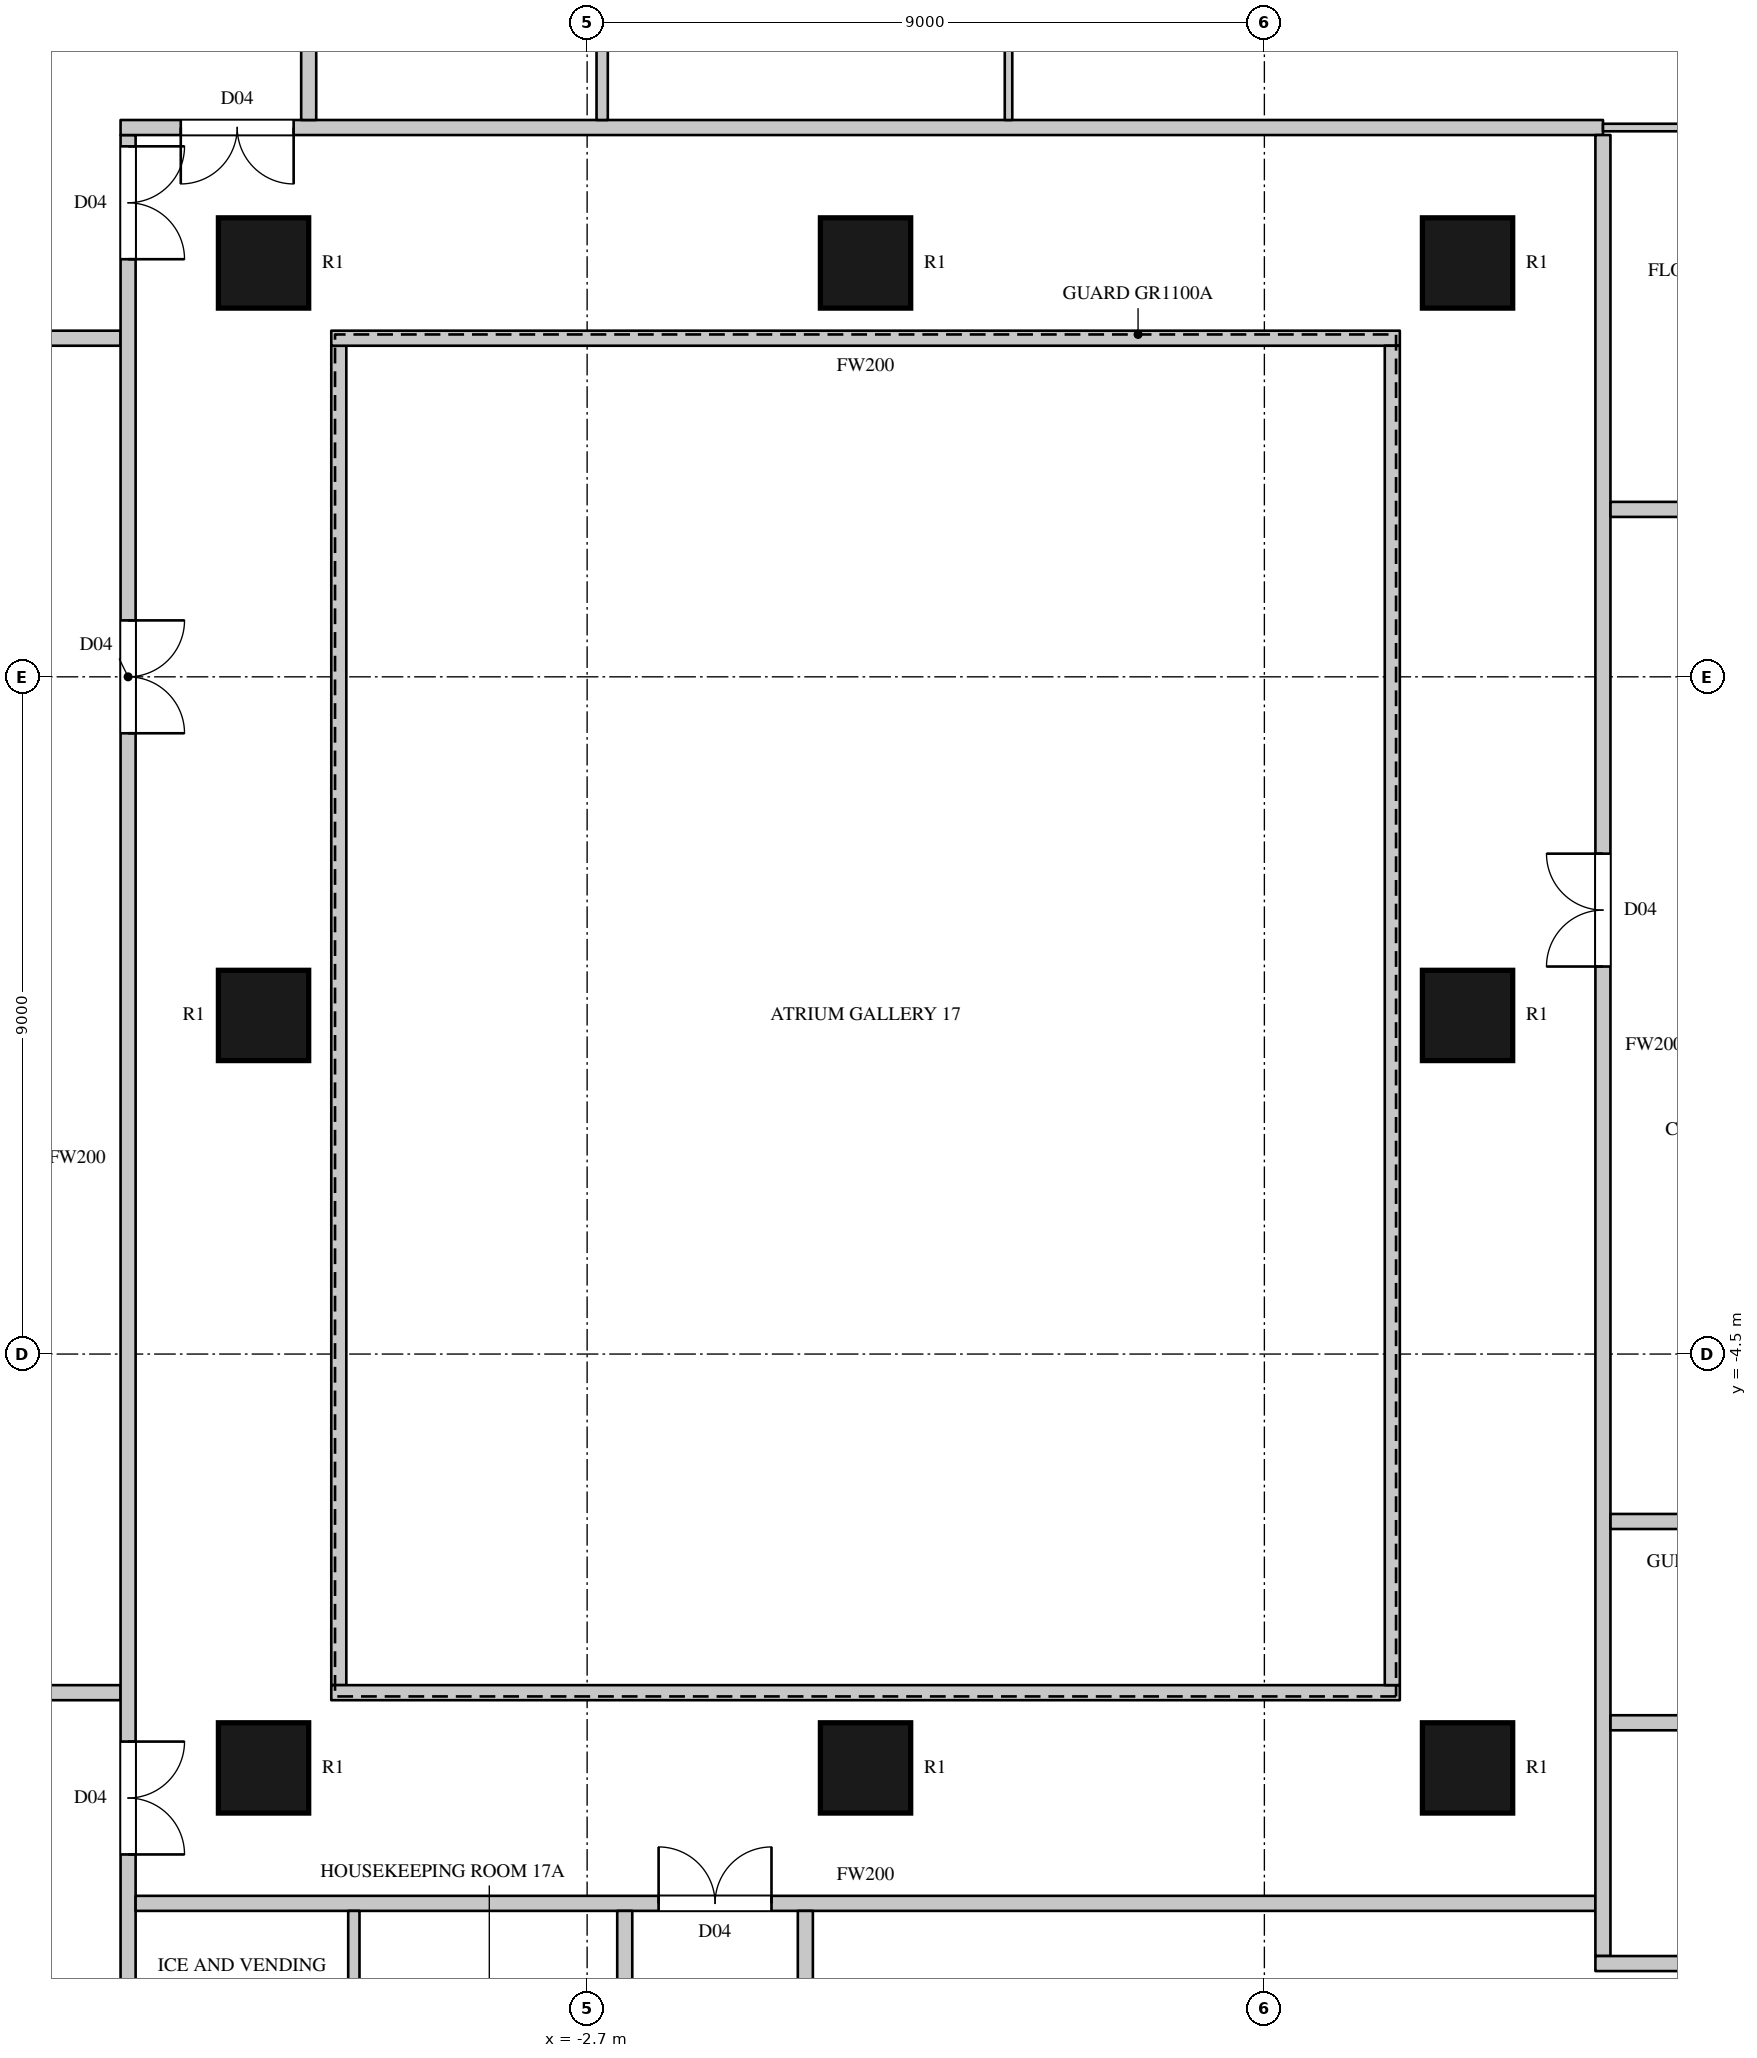
"""IFC4 building model, lengths in metres.
Left out: names, types, materials, properties, quantities, classifications, styles, units other than length and angle.
Written with IfcOpenShell. Run it as: python <this file> out.ifc"""

import sys

from ifc_helpers import new_model, si_unit, direction, frame, frame_2d, origin, origin_2d, place, context, subcontext, project, spatial, rectangle, circle, extrude, element, fill, save


model = new_model("IFC4")
c1 = context("Model", 3, precision=1e-05, world=origin(), true_north=direction((0.0, 1.0)))
c2 = subcontext(c1, "Body", "Model", "MODEL_VIEW")
j1 = project(units=[si_unit("LENGTHUNIT", "METRE"), si_unit("PLANEANGLEUNIT", "RADIAN")], contexts=[c1])
p1 = place(None, origin())
s1 = spatial("IfcSite", under=j1, at=p1, CompositionType="ELEMENT")
p2 = place(p1, origin())
s2 = spatial("IfcBuilding", under=s1, at=p2, CompositionType="ELEMENT")
p3 = place(p2, frame((0.0, 0.0, 91.5)))
s3 = spatial("IfcBuildingStorey", under=s2, at=p3, CompositionType="ELEMENT", Elevation=91.5)
for number, where, z_axis, x_axis in (
    (1, (-7.0, -10.0, 0.0), (0.0, 0.0, 1.0), (1.0, 0.0, 0.0)),
    (2, (-7.0, 0.0, 0.0), (0.0, 0.0, 1.0), (1.0, 0.0, 0.0)),
    (3, (-7.0, 10.0, 0.0), (0.0, 0.0, 1.0), (1.0, 0.0, 0.0)),
    (4, (1.0, -10.0, 0.0), (0.0, 0.0, 1.0), (1.0, 0.0, 0.0)),
    (5, (1.0, 10.0, 0.0), (0.0, 0.0, 1.0), (1.0, 0.0, 0.0)),
    (6, (9.0, -10.0, 0.0), (0.0, 0.0, 1.0), (1.0, 0.0, 0.0)),
    (7, (9.0, 0.0, 0.0), (0.0, 0.0, 1.0), (1.0, 0.0, 0.0)),
    (8, (9.0, 10.0, 0.0), (0.0, 0.0, 1.0), (1.0, 0.0, 0.0)),
):
    element("IfcColumn", number, at=place(p3, frame(where, z_axis=z_axis, x_axis=x_axis)), inside=s3, PredefinedType="COLUMN", context=c2, shape_type="SweptSolid", body=[
        extrude(circle(Radius=0.6, at=origin_2d()), origin(), (0.0, 0.0, 1.0), 3.6),
    ])
p4 = place(p3, frame((-13.97, -9.0, 0.0), z_axis=(0.0, 0.0, 1.0), x_axis=(1.0, 0.0, 0.0)))
e9 = element("IfcWall", 9, at=p4, inside=s3, PredefinedType="PARTITIONING", context=c2, shape_type="SweptSolid", body=[
    extrude(rectangle(XDim=5.07, YDim=0.2, at=frame_2d((2.535, 0.0))), origin(), (0.0, 0.0, 1.0), 3.3),
])
p5 = place(p4, frame((0.4, 0.0, 0.0)))
e10 = element("IfcOpeningElement", 10, at=p5, cuts=e9, PredefinedType="OPENING", context=c2, shape_type="SweptSolid", body=[
    extrude(rectangle(XDim=1.5, YDim=2.2, at=frame_2d((0.75, 1.1))), frame((0.0, 0.11, 0.0), z_axis=(0.0, -1.0, 0.0), x_axis=(1.0, 0.0, 0.0)), (0.0, 0.0, 1.0), 0.22),
])
p6 = place(p4, frame((2.05, 0.0, 0.0)))
e11 = element("IfcOpeningElement", 11, at=p6, cuts=e9, PredefinedType="OPENING", context=c2, shape_type="SweptSolid", body=[
    extrude(rectangle(XDim=1.5, YDim=2.2, at=frame_2d((0.75, 1.1))), frame((0.0, 0.11, 0.0), z_axis=(0.0, -1.0, 0.0), x_axis=(1.0, 0.0, 0.0)), (0.0, 0.0, 1.0), 0.22),
])
p7 = place(p3, frame((-13.97, 9.0, 0.0), z_axis=(0.0, 0.0, 1.0), x_axis=(1.0, 0.0, 0.0)))
e12 = element("IfcWall", 12, at=p7, inside=s3, PredefinedType="PARTITIONING", context=c2, shape_type="SweptSolid", body=[
    extrude(rectangle(XDim=5.07, YDim=0.2, at=frame_2d((2.535, 0.0))), origin(), (0.0, 0.0, 1.0), 3.3),
])
p8 = place(p3, frame((-8.8, -15.5, 0.0), z_axis=(0.0, 0.0, 1.0), x_axis=(0.0, 1.0, 0.0)))
e13 = element("IfcWall", 13, at=p8, inside=s3, PredefinedType="PARTITIONING", context=c2, shape_type="SweptSolid", body=[
    extrude(rectangle(XDim=27.2, YDim=0.2, at=frame_2d((13.6, 0.0))), origin(), (0.0, 0.0, 1.0), 3.3),
])
p9 = place(p8, frame((19.25, 0.0, 0.0)))
e14 = element("IfcOpeningElement", 14, at=p9, cuts=e13, PredefinedType="OPENING", context=c2, shape_type="SweptSolid", body=[
    extrude(rectangle(XDim=1.5, YDim=2.2, at=frame_2d((0.75, 1.1))), frame((0.0, 0.11, 0.0), z_axis=(0.0, -1.0, 0.0), x_axis=(1.0, 0.0, 0.0)), (0.0, 0.0, 1.0), 0.22),
])
p10 = place(p8, frame((4.35, 0.0, 0.0)))
e15 = element("IfcOpeningElement", 15, at=p10, cuts=e13, PredefinedType="OPENING", context=c2, shape_type="SweptSolid", body=[
    extrude(rectangle(XDim=1.5, YDim=2.2, at=frame_2d((0.75, 1.1))), frame((0.0, 0.11, 0.0), z_axis=(0.0, -1.0, 0.0), x_axis=(1.0, 0.0, 0.0)), (0.0, 0.0, 1.0), 0.22),
])
p11 = place(p8, frame((25.55, 0.0, 0.0)))
e16 = element("IfcOpeningElement", 16, at=p11, cuts=e13, PredefinedType="OPENING", context=c2, shape_type="SweptSolid", body=[
    extrude(rectangle(XDim=1.5, YDim=2.2, at=frame_2d((0.75, 1.1))), frame((0.0, 0.11, 0.0), z_axis=(0.0, -1.0, 0.0), x_axis=(1.0, 0.0, 0.0)), (0.0, 0.0, 1.0), 0.22),
])
p12 = place(p8, frame((0.15, 0.0, 0.0)))
e17 = element("IfcOpeningElement", 17, at=p12, cuts=e13, PredefinedType="OPENING", context=c2, shape_type="SweptSolid", body=[
    extrude(rectangle(XDim=0.9, YDim=2.2, at=frame_2d((0.45, 1.1))), frame((0.0, 0.11, 0.0), z_axis=(0.0, -1.0, 0.0), x_axis=(1.0, 0.0, 0.0)), (0.0, 0.0, 1.0), 0.22),
])
p13 = place(p3, frame((-8.7, -11.8, 0.0), z_axis=(0.0, 0.0, 1.0), x_axis=(1.0, 0.0, 0.0)))
e18 = element("IfcWall", 18, at=p13, inside=s3, PredefinedType="PARTITIONING", context=c2, shape_type="SweptSolid", body=[
    extrude(rectangle(XDim=19.4, YDim=0.2, at=frame_2d((9.7, 0.0))), origin(), (0.0, 0.0, 1.0), 3.3),
])
p14 = place(p13, frame((6.95, 0.0, 0.0)))
e19 = element("IfcOpeningElement", 19, at=p14, cuts=e18, PredefinedType="OPENING", context=c2, shape_type="SweptSolid", body=[
    extrude(rectangle(XDim=1.5, YDim=2.2, at=frame_2d((0.75, 1.1))), frame((0.0, 0.11, 0.0), z_axis=(0.0, -1.0, 0.0), x_axis=(1.0, 0.0, 0.0)), (0.0, 0.0, 1.0), 0.22),
])
p15 = place(p3, frame((-8.9, 11.8, 0.0), z_axis=(0.0, 0.0, 1.0), x_axis=(1.0, 0.0, 0.0)))
e20 = element("IfcWall", 20, at=p15, inside=s3, PredefinedType="PARTITIONING", context=c2, shape_type="SweptSolid", body=[
    extrude(rectangle(XDim=19.7, YDim=0.2, at=frame_2d((9.85, 0.0))), origin(), (0.0, 0.0, 1.0), 3.3),
])
p16 = place(p15, frame((0.8, 0.0, 0.0)))
e21 = element("IfcOpeningElement", 21, at=p16, cuts=e20, PredefinedType="OPENING", context=c2, shape_type="SweptSolid", body=[
    extrude(rectangle(XDim=1.5, YDim=2.2, at=frame_2d((0.75, 1.1))), frame((0.0, 0.11, 0.0), z_axis=(0.0, -1.0, 0.0), x_axis=(1.0, 0.0, 0.0)), (0.0, 0.0, 1.0), 0.22),
])
p17 = place(p3, frame((-6.4, 11.9, 0.0), z_axis=(0.0, 0.0, 1.0), x_axis=(0.0, 1.0, 0.0)))
e22 = element("IfcWall", 22, at=p17, inside=s3, PredefinedType="PARTITIONING", context=c2, shape_type="SweptSolid", body=[
    extrude(rectangle(XDim=3.6, YDim=0.2, at=frame_2d((1.8, 0.0))), origin(), (0.0, 0.0, 1.0), 3.3),
])
p18 = place(p17, frame((2.55, 0.0, 0.0)))
e23 = element("IfcOpeningElement", 23, at=p18, cuts=e22, PredefinedType="OPENING", context=c2, shape_type="SweptSolid", body=[
    extrude(rectangle(XDim=0.9, YDim=2.2, at=frame_2d((0.45, 1.1))), frame((0.0, 0.11, 0.0), z_axis=(0.0, -1.0, 0.0), x_axis=(1.0, 0.0, 0.0)), (0.0, 0.0, 1.0), 0.22),
])
p19 = place(p3, frame((-6.0, -8.9, 0.0), z_axis=(0.0, 0.0, 1.0), x_axis=(0.0, 1.0, 0.0)))
e24 = element("IfcWall", 24, at=p19, inside=s3, PredefinedType="PARTITIONING", context=c2, shape_type="SweptSolid", body=[
    extrude(rectangle(XDim=17.8, YDim=0.2, at=frame_2d((8.9, 0.0))), origin(), (0.0, 0.0, 1.0), 3.3),
])
for number, where, z_axis, x_axis in (
    (25, (-6.1, -9.0, 0.0), (0.0, 0.0, 1.0), (1.0, 0.0, 0.0)),
    (26, (-6.1, 9.0, 0.0), (0.0, 0.0, 1.0), (1.0, 0.0, 0.0)),
):
    element("IfcWall", number, at=place(p3, frame(where, z_axis=z_axis, x_axis=x_axis)), inside=s3, PredefinedType="PARTITIONING", context=c2, shape_type="SweptSolid", body=[
        extrude(rectangle(XDim=14.2, YDim=0.2, at=frame_2d((7.1, 0.0))), origin(), (0.0, 0.0, 1.0), 3.3),
    ])
p20 = place(p3, frame((-2.2, -15.5, 0.0), z_axis=(0.0, 0.0, 1.0), x_axis=(0.0, 1.0, 0.0)))
e27 = element("IfcWall", 27, at=p20, inside=s3, PredefinedType="PARTITIONING", context=c2, shape_type="SweptSolid", body=[
    extrude(rectangle(XDim=3.6, YDim=0.2, at=frame_2d((1.8, 0.0))), origin(), (0.0, 0.0, 1.0), 3.3),
])
p21 = place(p3, frame((0.2, -15.5, 0.0), z_axis=(0.0, 0.0, 1.0), x_axis=(0.0, 1.0, 0.0)))
e28 = element("IfcWall", 28, at=p21, inside=s3, PredefinedType="PARTITIONING", context=c2, shape_type="SweptSolid", body=[
    extrude(rectangle(XDim=3.6, YDim=0.2, at=frame_2d((1.8, 0.0))), origin(), (0.0, 0.0, 1.0), 3.3),
])
p22 = place(p21, frame((0.15, 0.0, 0.0)))
e29 = element("IfcOpeningElement", 29, at=p22, cuts=e28, PredefinedType="OPENING", context=c2, shape_type="SweptSolid", body=[
    extrude(rectangle(XDim=0.9, YDim=2.2, at=frame_2d((0.45, 1.1))), frame((0.0, 0.11, 0.0), z_axis=(0.0, -1.0, 0.0), x_axis=(1.0, 0.0, 0.0)), (0.0, 0.0, 1.0), 0.22),
])
p23 = place(p3, frame((8.0, -8.9, 0.0), z_axis=(0.0, 0.0, 1.0), x_axis=(0.0, 1.0, 0.0)))
e30 = element("IfcWall", 30, at=p23, inside=s3, PredefinedType="PARTITIONING", context=c2, shape_type="SweptSolid", body=[
    extrude(rectangle(XDim=17.8, YDim=0.2, at=frame_2d((8.9, 0.0))), origin(), (0.0, 0.0, 1.0), 3.3),
])
p24 = place(p3, frame((10.799, -12.5, 0.0), z_axis=(0.0, 0.0, 1.0), x_axis=(0.0, 1.0, 0.0)))
e31 = element("IfcWall", 31, at=p24, inside=s3, PredefinedType="PARTITIONING", context=c2, shape_type="SweptSolid", body=[
    extrude(rectangle(XDim=24.2, YDim=0.2, at=frame_2d((12.1, 0.0))), origin(), (0.0, 0.0, 1.0), 3.3),
])
p25 = place(p24, frame((13.15, 0.0, 0.0)))
e32 = element("IfcOpeningElement", 32, at=p25, cuts=e31, PredefinedType="OPENING", context=c2, shape_type="SweptSolid", body=[
    extrude(rectangle(XDim=1.5, YDim=2.2, at=frame_2d((0.75, 1.1))), frame((0.0, 0.11, 0.0), z_axis=(0.0, -1.0, 0.0), x_axis=(1.0, 0.0, 0.0)), (0.0, 0.0, 1.0), 0.22),
])
p26 = place(p3, frame((10.699, -12.6, 0.0), z_axis=(0.0, 0.0, 1.0), x_axis=(1.0, 0.0, 0.0)))
e33 = element("IfcWall", 33, at=p26, inside=s3, PredefinedType="PARTITIONING", context=c2, shape_type="SweptSolid", body=[
    extrude(rectangle(XDim=3.601, YDim=0.2, at=frame_2d((1.801, 0.0))), origin(), (0.0, 0.0, 1.0), 3.3),
])
p27 = place(p3, frame((10.9, -9.4, 0.0), z_axis=(0.0, 0.0, 1.0), x_axis=(1.0, 0.0, 0.0)))
e34 = element("IfcWall", 34, at=p27, inside=s3, PredefinedType="PARTITIONING", context=c2, shape_type="SweptSolid", body=[
    extrude(rectangle(XDim=3.4, YDim=0.2, at=frame_2d((1.7, 0.0))), origin(), (0.0, 0.0, 1.0), 3.3),
])
p28 = place(p27, frame((1.5, 0.0, 0.0)))
e35 = element("IfcOpeningElement", 35, at=p28, cuts=e34, PredefinedType="OPENING", context=c2, shape_type="SweptSolid", body=[
    extrude(rectangle(XDim=1.6, YDim=2.4, at=frame_2d((0.8, 1.2))), frame((0.0, 0.11, 0.0), z_axis=(0.0, -1.0, 0.0), x_axis=(1.0, 0.0, 0.0)), (0.0, 0.0, 1.0), 0.22),
])
p29 = place(p3, frame((10.9, -6.725, 0.0), z_axis=(0.0, 0.0, 1.0), x_axis=(1.0, 0.0, 0.0)))
e36 = element("IfcWall", 36, at=p29, inside=s3, PredefinedType="PARTITIONING", context=c2, shape_type="SweptSolid", body=[
    extrude(rectangle(XDim=3.4, YDim=0.2, at=frame_2d((1.7, 0.0))), origin(), (0.0, 0.0, 1.0), 3.3),
])
p30 = place(p3, frame((10.9, 6.725, 0.0), z_axis=(0.0, 0.0, 1.0), x_axis=(1.0, 0.0, 0.0)))
e37 = element("IfcWall", 37, at=p30, inside=s3, PredefinedType="PARTITIONING", context=c2, shape_type="SweptSolid", body=[
    extrude(rectangle(XDim=3.4, YDim=0.2, at=frame_2d((1.7, 0.0))), origin(), (0.0, 0.0, 1.0), 3.3),
])
p31 = place(p30, frame((2.1, 0.0, 0.0)))
e38 = element("IfcOpeningElement", 38, at=p31, cuts=e37, PredefinedType="OPENING", context=c2, shape_type="SweptSolid", body=[
    extrude(rectangle(XDim=0.95, YDim=2.2, at=frame_2d((0.475, 1.1))), frame((0.0, 0.11, 0.0), z_axis=(0.0, -1.0, 0.0), x_axis=(1.0, 0.0, 0.0)), (0.0, 0.0, 1.0), 0.22),
])
p32 = place(p3, frame((-5.8, -15.5, 0.0), z_axis=(0.0, 0.0, 1.0), x_axis=(0.0, 1.0, 0.0)))
e39 = element("IfcWall", 39, at=p32, inside=s3, PredefinedType="PARTITIONING", context=c2, shape_type="SweptSolid", body=[
    extrude(rectangle(XDim=3.6, YDim=0.15, at=frame_2d((1.8, 0.0))), origin(), (0.0, 0.0, 1.0), 3.3),
])
p33 = place(p3, frame((-2.5, 11.9, 0.0), z_axis=(0.0, 0.0, 1.0), x_axis=(0.0, 1.0, 0.0)))
e40 = element("IfcWall", 40, at=p33, inside=s3, PredefinedType="PARTITIONING", context=c2, shape_type="SweptSolid", body=[
    extrude(rectangle(XDim=3.6, YDim=0.15, at=frame_2d((1.8, 0.0))), origin(), (0.0, 0.0, 1.0), 2.75),
])
p34 = place(p3, frame((2.9, 11.9, 0.0), z_axis=(0.0, 0.0, 1.0), x_axis=(0.0, 1.0, 0.0)))
e41 = element("IfcWall", 41, at=p34, inside=s3, PredefinedType="PARTITIONING", context=c2, shape_type="SweptSolid", body=[
    extrude(rectangle(XDim=3.6, YDim=0.1, at=frame_2d((1.8, 0.0))), origin(), (0.0, 0.0, 1.0), 3.3),
])
p35 = place(p3, frame((10.8, 11.8, 0.0), z_axis=(0.0, 0.0, 1.0), x_axis=(1.0, 0.0, 0.0)))
e42 = element("IfcWall", 42, at=p35, inside=s3, PredefinedType="PARTITIONING", context=c2, shape_type="SweptSolid", body=[
    extrude(rectangle(XDim=3.3, YDim=0.1, at=frame_2d((1.65, 0.0))), origin(), (0.0, 0.0, 1.0), 3.3),
])
p36 = place(p9, origin())
e43 = element("IfcDoor", 43, at=p36, inside=s3, OperationType="DOUBLE_DOOR_SINGLE_SWING", PredefinedType="DOOR", context=c2, shape_type="SweptSolid", body=[
    extrude(rectangle(XDim=1.5, YDim=2.2, at=frame_2d((0.75, 1.1))), frame((0.0, 0.025, 0.0), z_axis=(0.0, -1.0, 0.0), x_axis=(1.0, 0.0, 0.0)), (0.0, 0.0, 1.0), 0.05),
])
fill(e14, e43)
p37 = place(p10, origin())
e44 = element("IfcDoor", 44, at=p37, inside=s3, OperationType="DOUBLE_DOOR_SINGLE_SWING", PredefinedType="DOOR", context=c2, shape_type="SweptSolid", body=[
    extrude(rectangle(XDim=1.5, YDim=2.2, at=frame_2d((0.75, 1.1))), frame((0.0, 0.025, 0.0), z_axis=(0.0, -1.0, 0.0), x_axis=(1.0, 0.0, 0.0)), (0.0, 0.0, 1.0), 0.05),
])
fill(e15, e44)
p38 = place(p11, origin())
e45 = element("IfcDoor", 45, at=p38, inside=s3, OperationType="DOUBLE_DOOR_SINGLE_SWING", PredefinedType="DOOR", context=c2, shape_type="SweptSolid", body=[
    extrude(rectangle(XDim=1.5, YDim=2.2, at=frame_2d((0.75, 1.1))), frame((0.0, 0.025, 0.0), z_axis=(0.0, -1.0, 0.0), x_axis=(1.0, 0.0, 0.0)), (0.0, 0.0, 1.0), 0.05),
])
fill(e16, e45)
p39 = place(p14, origin())
e46 = element("IfcDoor", 46, at=p39, inside=s3, OperationType="DOUBLE_DOOR_SINGLE_SWING", PredefinedType="DOOR", context=c2, shape_type="SweptSolid", body=[
    extrude(rectangle(XDim=1.5, YDim=2.2, at=frame_2d((0.75, 1.1))), frame((0.0, 0.025, 0.0), z_axis=(0.0, -1.0, 0.0), x_axis=(1.0, 0.0, 0.0)), (0.0, 0.0, 1.0), 0.05),
])
fill(e19, e46)
p40 = place(p16, origin())
e47 = element("IfcDoor", 47, at=p40, inside=s3, OperationType="DOUBLE_DOOR_SINGLE_SWING", PredefinedType="DOOR", context=c2, shape_type="SweptSolid", body=[
    extrude(rectangle(XDim=1.5, YDim=2.2, at=frame_2d((0.75, 1.1))), frame((0.0, 0.025, 0.0), z_axis=(0.0, -1.0, 0.0), x_axis=(1.0, 0.0, 0.0)), (0.0, 0.0, 1.0), 0.05),
])
fill(e21, e47)
p41 = place(p25, origin())
e48 = element("IfcDoor", 48, at=p41, inside=s3, OperationType="DOUBLE_DOOR_SINGLE_SWING", PredefinedType="DOOR", context=c2, shape_type="SweptSolid", body=[
    extrude(rectangle(XDim=1.5, YDim=2.2, at=frame_2d((0.75, 1.1))), frame((0.0, 0.025, 0.0), z_axis=(0.0, -1.0, 0.0), x_axis=(1.0, 0.0, 0.0)), (0.0, 0.0, 1.0), 0.05),
])
fill(e32, e48)
save(model, sys.argv[1])
